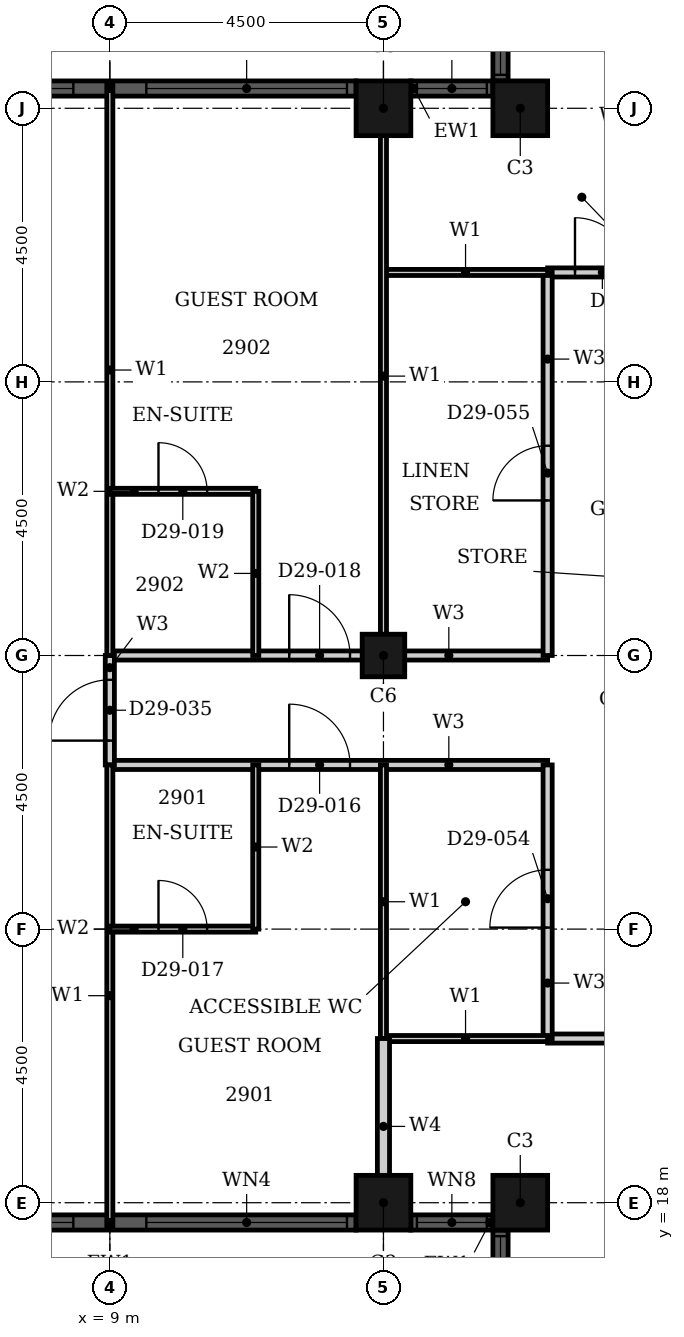
"""IFC4 building model, lengths in metres.
Left out: names, types, materials, properties, quantities, classifications, styles, units other than length and angle.
Written with IfcOpenShell. Run it as: python <this file> out.ifc"""

import sys

from ifc_helpers import new_model, si_unit, direction, frame, frame_2d, origin, origin_2d, place, context, subcontext, project, spatial, rectangle, hollow_rectangle, extrude, element, fill, save


model = new_model("IFC4")
c1 = context("Model", 3, precision=1e-05, world=origin(), true_north=direction((0.0, 1.0)))
c2 = subcontext(c1, "Body", "Model", "MODEL_VIEW")
j1 = project(units=[si_unit("LENGTHUNIT", "METRE"), si_unit("PLANEANGLEUNIT", "RADIAN")], contexts=[c1])
p1 = place(None, origin())
s1 = spatial("IfcSite", under=j1, at=p1, CompositionType="ELEMENT")
p2 = place(p1, origin())
s2 = spatial("IfcBuilding", under=s1, at=p2, CompositionType="ELEMENT")
p3 = place(p2, frame((0.0, 0.0, 118.8)))
s3 = spatial("IfcBuildingStorey", under=s2, at=p3, CompositionType="ELEMENT", Elevation=118.8)
for number, where, z_axis, x_axis in (
    (1, (15.75, 36.0, 0.0), (0.0, 0.0, 1.0), (1.0, 0.0, 0.0)),
    (2, (13.5, 36.0, 0.0), (0.0, 0.0, 1.0), (1.0, 0.0, 0.0)),
    (3, (13.5, 18.0, 0.0), (0.0, 0.0, 1.0), (1.0, 0.0, 0.0)),
    (4, (15.75, 18.0, 0.0), (0.0, 0.0, 1.0), (1.0, 0.0, 0.0)),
):
    element("IfcColumn", number, at=place(p3, frame(where, z_axis=z_axis, x_axis=x_axis)), inside=s3, PredefinedType="COLUMN", context=c2, shape_type="SweptSolid", body=[
        extrude(hollow_rectangle(XDim=0.9, YDim=0.9, WallThickness=0.028, at=origin_2d()), origin(), (0.0, 0.0, 1.0), 3.6),
    ])
p4 = place(p3, frame((13.5, 27.0, 0.0), z_axis=(0.0, 0.0, 1.0), x_axis=(1.0, 0.0, 0.0)))
e5 = element("IfcColumn", 5, at=p4, inside=s3, PredefinedType="COLUMN", context=c2, shape_type="SweptSolid", body=[
    extrude(hollow_rectangle(XDim=0.7, YDim=0.7, WallThickness=0.022, at=origin_2d()), origin(), (0.0, 0.0, 1.0), 3.6),
])
p5 = place(p3, frame((15.425, 37.8, 0.0), z_axis=(0.0, 0.0, 1.0), x_axis=(0.0, -1.0, 0.0)))
e6 = element("IfcWall", 6, at=p5, inside=s3, PredefinedType="SOLIDWALL", context=c2, shape_type="SweptSolid", body=[
    extrude(rectangle(XDim=1.35, YDim=0.25, at=frame_2d((0.675, 0.0))), origin(), (0.0, 0.0, 1.0), 3.6),
])
p6 = place(p5, frame((0.1, 0.0, 0.9)))
e7 = element("IfcOpeningElement", 7, at=p6, cuts=e6, PredefinedType="OPENING", context=c2, shape_type="SweptSolid", body=[
    extrude(rectangle(XDim=1.15, YDim=2.08, at=frame_2d((0.575, 1.04))), frame((0.0, 0.135, 0.0), z_axis=(0.0, -1.0, 0.0), x_axis=(1.0, 0.0, 0.0)), (0.0, 0.0, 1.0), 0.27),
])
p7 = place(p3, frame((15.3, 36.325, 0.0), z_axis=(0.0, 0.0, 1.0), x_axis=(-1.0, 0.0, 0.0)))
e8 = element("IfcWall", 8, at=p7, inside=s3, PredefinedType="SOLIDWALL", context=c2, shape_type="SweptSolid", body=[
    extrude(rectangle(XDim=1.35, YDim=0.25, at=frame_2d((0.675, 0.0))), origin(), (0.0, 0.0, 1.0), 3.6),
])
p8 = place(p7, frame((0.1, 0.0, 0.9)))
e9 = element("IfcOpeningElement", 9, at=p8, cuts=e8, PredefinedType="OPENING", context=c2, shape_type="SweptSolid", body=[
    extrude(rectangle(XDim=1.15, YDim=2.08, at=frame_2d((0.575, 1.04))), frame((0.0, 0.135, 0.0), z_axis=(0.0, -1.0, 0.0), x_axis=(1.0, 0.0, 0.0)), (0.0, 0.0, 1.0), 0.27),
])
p9 = place(p3, frame((13.05, 36.325, 0.0), z_axis=(0.0, 0.0, 1.0), x_axis=(-1.0, 0.0, 0.0)))
e10 = element("IfcWall", 10, at=p9, inside=s3, PredefinedType="SOLIDWALL", context=c2, shape_type="SweptSolid", body=[
    extrude(rectangle(XDim=8.1, YDim=0.25, at=frame_2d((4.05, 0.0))), origin(), (0.0, 0.0, 1.0), 3.6),
])
p10 = place(p9, frame((0.15, 0.0, 0.9)))
e11 = element("IfcOpeningElement", 11, at=p10, cuts=e10, PredefinedType="OPENING", context=c2, shape_type="SweptSolid", body=[
    extrude(rectangle(XDim=3.3, YDim=2.08, at=frame_2d((1.65, 1.04))), frame((0.0, 0.135, 0.0), z_axis=(0.0, -1.0, 0.0), x_axis=(1.0, 0.0, 0.0)), (0.0, 0.0, 1.0), 0.27),
])
p11 = place(p9, frame((4.65, 0.0, 0.9)))
e12 = element("IfcOpeningElement", 12, at=p11, cuts=e10, PredefinedType="OPENING", context=c2, shape_type="SweptSolid", body=[
    extrude(rectangle(XDim=3.3, YDim=2.08, at=frame_2d((1.65, 1.04))), frame((0.0, 0.135, 0.0), z_axis=(0.0, -1.0, 0.0), x_axis=(1.0, 0.0, 0.0)), (0.0, 0.0, 1.0), 0.27),
])
p12 = place(p3, frame((4.95, 17.675, 0.0), z_axis=(0.0, 0.0, 1.0), x_axis=(1.0, 0.0, 0.0)))
e13 = element("IfcWall", 13, at=p12, inside=s3, PredefinedType="SOLIDWALL", context=c2, shape_type="SweptSolid", body=[
    extrude(rectangle(XDim=8.1, YDim=0.25, at=frame_2d((4.05, 0.0))), origin(), (0.0, 0.0, 1.0), 3.6),
])
p13 = place(p12, frame((0.15, 0.0, 0.9)))
e14 = element("IfcOpeningElement", 14, at=p13, cuts=e13, PredefinedType="OPENING", context=c2, shape_type="SweptSolid", body=[
    extrude(rectangle(XDim=3.3, YDim=2.08, at=frame_2d((1.65, 1.04))), frame((0.0, 0.135, 0.0), z_axis=(0.0, -1.0, 0.0), x_axis=(1.0, 0.0, 0.0)), (0.0, 0.0, 1.0), 0.27),
])
p14 = place(p12, frame((4.65, 0.0, 0.9)))
e15 = element("IfcOpeningElement", 15, at=p14, cuts=e13, PredefinedType="OPENING", context=c2, shape_type="SweptSolid", body=[
    extrude(rectangle(XDim=3.3, YDim=2.08, at=frame_2d((1.65, 1.04))), frame((0.0, 0.135, 0.0), z_axis=(0.0, -1.0, 0.0), x_axis=(1.0, 0.0, 0.0)), (0.0, 0.0, 1.0), 0.27),
])
p15 = place(p3, frame((13.95, 17.675, 0.0), z_axis=(0.0, 0.0, 1.0), x_axis=(1.0, 0.0, 0.0)))
e16 = element("IfcWall", 16, at=p15, inside=s3, PredefinedType="SOLIDWALL", context=c2, shape_type="SweptSolid", body=[
    extrude(rectangle(XDim=1.35, YDim=0.25, at=frame_2d((0.675, 0.0))), origin(), (0.0, 0.0, 1.0), 3.6),
])
p16 = place(p15, frame((0.1, 0.0, 0.9)))
e17 = element("IfcOpeningElement", 17, at=p16, cuts=e16, PredefinedType="OPENING", context=c2, shape_type="SweptSolid", body=[
    extrude(rectangle(XDim=1.15, YDim=2.08, at=frame_2d((0.575, 1.04))), frame((0.0, 0.135, 0.0), z_axis=(0.0, -1.0, 0.0), x_axis=(1.0, 0.0, 0.0)), (0.0, 0.0, 1.0), 0.27),
])
p17 = place(p3, frame((15.425, 17.55, 0.0), z_axis=(0.0, 0.0, 1.0), x_axis=(0.0, -1.0, 0.0)))
e18 = element("IfcWall", 18, at=p17, inside=s3, PredefinedType="SOLIDWALL", context=c2, shape_type="SweptSolid", body=[
    extrude(rectangle(XDim=1.35, YDim=0.25, at=frame_2d((0.675, 0.0))), origin(), (0.0, 0.0, 1.0), 3.6),
])
p18 = place(p17, frame((0.1, 0.0, 0.9)))
e19 = element("IfcOpeningElement", 19, at=p18, cuts=e18, PredefinedType="OPENING", context=c2, shape_type="SweptSolid", body=[
    extrude(rectangle(XDim=1.15, YDim=2.08, at=frame_2d((0.575, 1.04))), frame((0.0, 0.135, 0.0), z_axis=(0.0, -1.0, 0.0), x_axis=(1.0, 0.0, 0.0)), (0.0, 0.0, 1.0), 0.27),
])
p19 = place(p3, frame((16.2, 20.7, 0.0), z_axis=(0.0, 0.0, 1.0), x_axis=(1.0, 0.0, 0.0)))
e20 = element("IfcWall", 20, at=p19, inside=s3, PredefinedType="PARTITIONING", context=c2, shape_type="SweptSolid", body=[
    extrude(rectangle(XDim=13.5, YDim=0.15, at=frame_2d((6.75, 0.0))), origin(), (0.0, 0.0, 1.0), 3.3),
])
p20 = place(p19, frame((4.75, 0.0, 0.0)))
e21 = element("IfcOpeningElement", 21, at=p20, cuts=e20, PredefinedType="OPENING", context=c2, shape_type="SweptSolid", body=[
    extrude(rectangle(XDim=1.0, YDim=2.1, at=frame_2d((0.5, 1.05))), frame((0.0, 0.085, 0.0), z_axis=(0.0, -1.0, 0.0), x_axis=(1.0, 0.0, 0.0)), (0.0, 0.0, 1.0), 0.17),
])
p21 = place(p19, frame((9.45, 0.0, 0.0)))
e22 = element("IfcOpeningElement", 22, at=p21, cuts=e20, PredefinedType="OPENING", context=c2, shape_type="SweptSolid", body=[
    extrude(rectangle(XDim=0.9, YDim=2.1, at=frame_2d((0.45, 1.05))), frame((0.0, 0.085, 0.0), z_axis=(0.0, -1.0, 0.0), x_axis=(1.0, 0.0, 0.0)), (0.0, 0.0, 1.0), 0.17),
])
p22 = place(p3, frame((9.0, 25.2, 0.0), z_axis=(0.0, 0.0, 1.0), x_axis=(1.0, 0.0, 0.0)))
e23 = element("IfcWall", 23, at=p22, inside=s3, PredefinedType="PARTITIONING", context=c2, shape_type="SweptSolid", body=[
    extrude(rectangle(XDim=7.2, YDim=0.15, at=frame_2d((3.6, 0.0))), origin(), (0.0, 0.0, 1.0), 3.3),
])
p23 = place(p22, frame((2.95, 0.0, 0.0)))
e24 = element("IfcOpeningElement", 24, at=p23, cuts=e23, PredefinedType="OPENING", context=c2, shape_type="SweptSolid", body=[
    extrude(rectangle(XDim=1.0, YDim=2.1, at=frame_2d((0.5, 1.05))), frame((0.0, 0.085, 0.0), z_axis=(0.0, -1.0, 0.0), x_axis=(1.0, 0.0, 0.0)), (0.0, 0.0, 1.0), 0.17),
])
p24 = place(p3, frame((9.0, 27.0, 0.0), z_axis=(0.0, 0.0, 1.0), x_axis=(1.0, 0.0, 0.0)))
e25 = element("IfcWall", 25, at=p24, inside=s3, PredefinedType="PARTITIONING", context=c2, shape_type="SweptSolid", body=[
    extrude(rectangle(XDim=7.2, YDim=0.15, at=frame_2d((3.6, 0.0))), origin(), (0.0, 0.0, 1.0), 2.58),
])
p25 = place(p24, frame((2.95, 0.0, 0.0)))
e26 = element("IfcOpeningElement", 26, at=p25, cuts=e25, PredefinedType="OPENING", context=c2, shape_type="SweptSolid", body=[
    extrude(rectangle(XDim=1.0, YDim=2.1, at=frame_2d((0.5, 1.05))), frame((0.0, 0.085, 0.0), z_axis=(0.0, -1.0, 0.0), x_axis=(1.0, 0.0, 0.0)), (0.0, 0.0, 1.0), 0.17),
])
p26 = place(p3, frame((16.2, 33.3, 0.0), z_axis=(0.0, 0.0, 1.0), x_axis=(1.0, 0.0, 0.0)))
e27 = element("IfcWall", 27, at=p26, inside=s3, PredefinedType="PARTITIONING", context=c2, shape_type="SweptSolid", body=[
    extrude(rectangle(XDim=15.3, YDim=0.15, at=frame_2d((7.65, 0.0))), origin(), (0.0, 0.0, 1.0), 3.3),
])
p27 = place(p26, frame((4.75, 0.0, 0.0)))
e28 = element("IfcOpeningElement", 28, at=p27, cuts=e27, PredefinedType="OPENING", context=c2, shape_type="SweptSolid", body=[
    extrude(rectangle(XDim=1.0, YDim=2.1, at=frame_2d((0.5, 1.05))), frame((0.0, 0.085, 0.0), z_axis=(0.0, -1.0, 0.0), x_axis=(1.0, 0.0, 0.0)), (0.0, 0.0, 1.0), 0.17),
])
p28 = place(p26, frame((0.45, 0.0, 0.0)))
e29 = element("IfcOpeningElement", 29, at=p28, cuts=e27, PredefinedType="OPENING", context=c2, shape_type="SweptSolid", body=[
    extrude(rectangle(XDim=0.9, YDim=2.1, at=frame_2d((0.45, 1.05))), frame((0.0, 0.085, 0.0), z_axis=(0.0, -1.0, 0.0), x_axis=(1.0, 0.0, 0.0)), (0.0, 0.0, 1.0), 0.17),
])
p29 = place(p26, frame((10.35, 0.0, 0.0)))
e30 = element("IfcOpeningElement", 30, at=p29, cuts=e27, PredefinedType="OPENING", context=c2, shape_type="SweptSolid", body=[
    extrude(rectangle(XDim=0.9, YDim=2.1, at=frame_2d((0.45, 1.05))), frame((0.0, 0.085, 0.0), z_axis=(0.0, -1.0, 0.0), x_axis=(1.0, 0.0, 0.0)), (0.0, 0.0, 1.0), 0.17),
])
p30 = place(p3, frame((16.2, 27.0, 0.0), z_axis=(0.0, 0.0, 1.0), x_axis=(0.0, 1.0, 0.0)))
e31 = element("IfcWall", 31, at=p30, inside=s3, PredefinedType="PARTITIONING", context=c2, shape_type="SweptSolid", body=[
    extrude(rectangle(XDim=6.3, YDim=0.15, at=frame_2d((3.15, 0.0))), origin(), (0.0, 0.0, 1.0), 3.3),
])
p31 = place(p30, frame((2.55, 0.0, 0.0)))
e32 = element("IfcOpeningElement", 32, at=p31, cuts=e31, PredefinedType="OPENING", context=c2, shape_type="SweptSolid", body=[
    extrude(rectangle(XDim=0.9, YDim=2.1, at=frame_2d((0.45, 1.05))), frame((0.0, 0.085, 0.0), z_axis=(0.0, -1.0, 0.0), x_axis=(1.0, 0.0, 0.0)), (0.0, 0.0, 1.0), 0.17),
])
p32 = place(p3, frame((16.2, 20.7, 0.0), z_axis=(0.0, 0.0, 1.0), x_axis=(0.0, 1.0, 0.0)))
e33 = element("IfcWall", 33, at=p32, inside=s3, PredefinedType="PARTITIONING", context=c2, shape_type="SweptSolid", body=[
    extrude(rectangle(XDim=4.5, YDim=0.15, at=frame_2d((2.25, 0.0))), origin(), (0.0, 0.0, 1.0), 3.3),
])
p33 = place(p32, frame((1.825, 0.0, 0.0)))
e34 = element("IfcOpeningElement", 34, at=p33, cuts=e33, PredefinedType="OPENING", context=c2, shape_type="SweptSolid", body=[
    extrude(rectangle(XDim=0.95, YDim=2.1, at=frame_2d((0.475, 1.05))), frame((0.0, 0.085, 0.0), z_axis=(0.0, -1.0, 0.0), x_axis=(1.0, 0.0, 0.0)), (0.0, 0.0, 1.0), 0.17),
])
p34 = place(p3, frame((9.0, 25.2, 0.0), z_axis=(0.0, 0.0, 1.0), x_axis=(0.0, 1.0, 0.0)))
e35 = element("IfcWall", 35, at=p34, inside=s3, PredefinedType="PARTITIONING", context=c2, shape_type="SweptSolid", body=[
    extrude(rectangle(XDim=1.8, YDim=0.15, at=frame_2d((0.9, 0.0))), origin(), (0.0, 0.0, 1.0), 3.3),
])
p35 = place(p34, frame((0.4, 0.0, 0.0)))
e36 = element("IfcOpeningElement", 36, at=p35, cuts=e35, PredefinedType="OPENING", context=c2, shape_type="SweptSolid", body=[
    extrude(rectangle(XDim=1.0, YDim=2.1, at=frame_2d((0.5, 1.05))), frame((0.0, 0.085, 0.0), z_axis=(0.0, -1.0, 0.0), x_axis=(1.0, 0.0, 0.0)), (0.0, 0.0, 1.0), 0.17),
])
for number, where, z_axis, x_axis in (
    (37, (13.5, 20.7, 0.0), (0.0, 0.0, 1.0), (1.0, 0.0, 0.0)),
    (38, (13.5, 33.3, 0.0), (0.0, 0.0, 1.0), (1.0, 0.0, 0.0)),
):
    element("IfcWall", number, at=place(p3, frame(where, z_axis=z_axis, x_axis=x_axis)), inside=s3, PredefinedType="PARTITIONING", context=c2, shape_type="SweptSolid", body=[
        extrude(rectangle(XDim=2.7, YDim=0.1, at=frame_2d((1.35, 0.0))), origin(), (0.0, 0.0, 1.0), 3.3),
    ])
p36 = place(p3, frame((13.5, 27.0, 0.0), z_axis=(0.0, 0.0, 1.0), x_axis=(0.0, 1.0, 0.0)))
e39 = element("IfcWall", 39, at=p36, inside=s3, PredefinedType="PARTITIONING", context=c2, shape_type="SweptSolid", body=[
    extrude(rectangle(XDim=9.19, YDim=0.1, at=frame_2d((4.595, 0.0))), origin(), (0.0, 0.0, 1.0), 2.38),
])
p37 = place(p3, frame((13.5, 20.7, 0.0), z_axis=(0.0, 0.0, 1.0), x_axis=(0.0, 1.0, 0.0)))
e40 = element("IfcWall", 40, at=p37, inside=s3, PredefinedType="PARTITIONING", context=c2, shape_type="SweptSolid", body=[
    extrude(rectangle(XDim=4.5, YDim=0.1, at=frame_2d((2.25, 0.0))), origin(), (0.0, 0.0, 1.0), 2.38),
])
p38 = place(p3, frame((9.0, 27.0, 0.0), z_axis=(0.0, 0.0, 1.0), x_axis=(0.0, 1.0, 0.0)))
e41 = element("IfcWall", 41, at=p38, inside=s3, PredefinedType="PARTITIONING", context=c2, shape_type="SweptSolid", body=[
    extrude(rectangle(XDim=9.39, YDim=0.1, at=frame_2d((4.695, 0.0))), origin(), (0.0, 0.0, 1.0), 3.3),
])
p39 = place(p3, frame((9.0, 17.61, 0.0), z_axis=(0.0, 0.0, 1.0), x_axis=(0.0, 1.0, 0.0)))
e42 = element("IfcWall", 42, at=p39, inside=s3, PredefinedType="PARTITIONING", context=c2, shape_type="SweptSolid", body=[
    extrude(rectangle(XDim=7.59, YDim=0.1, at=frame_2d((3.795, 0.0))), origin(), (0.0, 0.0, 1.0), 3.3),
])
p40 = place(p3, frame((13.5, 17.81, 0.0), z_axis=(0.0, 0.0, 1.0), x_axis=(0.0, 1.0, 0.0)))
e43 = element("IfcWall", 43, at=p40, inside=s3, PredefinedType="PARTITIONING", context=c2, shape_type="SweptSolid", body=[
    extrude(rectangle(XDim=2.89, YDim=0.2, at=frame_2d((1.445, 0.0))), origin(), (0.0, 0.0, 1.0), 2.38),
])
p41 = place(p3, frame((9.0, 22.5, 0.0), z_axis=(0.0, 0.0, 1.0), x_axis=(1.0, 0.0, 0.0)))
e44 = element("IfcWall", 44, at=p41, inside=s3, PredefinedType="PARTITIONING", context=c2, shape_type="SweptSolid", body=[
    extrude(rectangle(XDim=2.4, YDim=0.1, at=frame_2d((1.2, 0.0))), origin(), (0.0, 0.0, 1.0), 2.58),
])
p42 = place(p41, frame((0.8, 0.0, 0.0)))
e45 = element("IfcOpeningElement", 45, at=p42, cuts=e44, PredefinedType="OPENING", context=c2, shape_type="SweptSolid", body=[
    extrude(rectangle(XDim=0.8, YDim=2.1, at=frame_2d((0.4, 1.05))), frame((0.0, 0.06, 0.0), z_axis=(0.0, -1.0, 0.0), x_axis=(1.0, 0.0, 0.0)), (0.0, 0.0, 1.0), 0.12),
])
p43 = place(p3, frame((9.0, 29.7, 0.0), z_axis=(0.0, 0.0, 1.0), x_axis=(1.0, 0.0, 0.0)))
e46 = element("IfcWall", 46, at=p43, inside=s3, PredefinedType="PARTITIONING", context=c2, shape_type="SweptSolid", body=[
    extrude(rectangle(XDim=2.4, YDim=0.1, at=frame_2d((1.2, 0.0))), origin(), (0.0, 0.0, 1.0), 3.3),
])
p44 = place(p43, frame((0.8, 0.0, 0.0)))
e47 = element("IfcOpeningElement", 47, at=p44, cuts=e46, PredefinedType="OPENING", context=c2, shape_type="SweptSolid", body=[
    extrude(rectangle(XDim=0.8, YDim=2.1, at=frame_2d((0.4, 1.05))), frame((0.0, 0.06, 0.0), z_axis=(0.0, -1.0, 0.0), x_axis=(1.0, 0.0, 0.0)), (0.0, 0.0, 1.0), 0.12),
])
for number, where, z_axis, x_axis in (
    (48, (11.4, 27.0, 0.0), (0.0, 0.0, 1.0), (0.0, 1.0, 0.0)),
    (49, (11.4, 22.5, 0.0), (0.0, 0.0, 1.0), (0.0, 1.0, 0.0)),
):
    element("IfcWall", number, at=place(p3, frame(where, z_axis=z_axis, x_axis=x_axis)), inside=s3, PredefinedType="PARTITIONING", context=c2, shape_type="SweptSolid", body=[
        extrude(rectangle(XDim=2.7, YDim=0.1, at=frame_2d((1.35, 0.0))), origin(), (0.0, 0.0, 1.0), 3.3),
    ])
p45 = place(p6, origin())
e50 = element("IfcWindow", 50, at=p45, inside=s3, PartitioningType="SINGLE_PANEL", PredefinedType="WINDOW", context=c2, shape_type="SweptSolid", body=[
    extrude(rectangle(XDim=1.15, YDim=2.08, at=frame_2d((0.575, 1.04))), frame((0.0, 0.03, 0.0), z_axis=(0.0, -1.0, 0.0), x_axis=(1.0, 0.0, 0.0)), (0.0, 0.0, 1.0), 0.06),
])
fill(e7, e50)
p46 = place(p8, origin())
e51 = element("IfcWindow", 51, at=p46, inside=s3, PartitioningType="SINGLE_PANEL", PredefinedType="WINDOW", context=c2, shape_type="SweptSolid", body=[
    extrude(rectangle(XDim=1.15, YDim=2.08, at=frame_2d((0.575, 1.04))), frame((0.0, 0.03, 0.0), z_axis=(0.0, -1.0, 0.0), x_axis=(1.0, 0.0, 0.0)), (0.0, 0.0, 1.0), 0.06),
])
fill(e9, e51)
p47 = place(p10, origin())
e52 = element("IfcWindow", 52, at=p47, inside=s3, PartitioningType="SINGLE_PANEL", PredefinedType="WINDOW", context=c2, shape_type="SweptSolid", body=[
    extrude(rectangle(XDim=3.3, YDim=2.08, at=frame_2d((1.65, 1.04))), frame((0.0, 0.03, 0.0), z_axis=(0.0, -1.0, 0.0), x_axis=(1.0, 0.0, 0.0)), (0.0, 0.0, 1.0), 0.06),
])
fill(e11, e52)
p48 = place(p11, origin())
e53 = element("IfcWindow", 53, at=p48, inside=s3, PartitioningType="SINGLE_PANEL", PredefinedType="WINDOW", context=c2, shape_type="SweptSolid", body=[
    extrude(rectangle(XDim=3.3, YDim=2.08, at=frame_2d((1.65, 1.04))), frame((0.0, 0.03, 0.0), z_axis=(0.0, -1.0, 0.0), x_axis=(1.0, 0.0, 0.0)), (0.0, 0.0, 1.0), 0.06),
])
fill(e12, e53)
p49 = place(p13, origin())
e54 = element("IfcWindow", 54, at=p49, inside=s3, PartitioningType="SINGLE_PANEL", PredefinedType="WINDOW", context=c2, shape_type="SweptSolid", body=[
    extrude(rectangle(XDim=3.3, YDim=2.08, at=frame_2d((1.65, 1.04))), frame((0.0, 0.03, 0.0), z_axis=(0.0, -1.0, 0.0), x_axis=(1.0, 0.0, 0.0)), (0.0, 0.0, 1.0), 0.06),
])
fill(e14, e54)
p50 = place(p14, origin())
e55 = element("IfcWindow", 55, at=p50, inside=s3, PartitioningType="SINGLE_PANEL", PredefinedType="WINDOW", context=c2, shape_type="SweptSolid", body=[
    extrude(rectangle(XDim=3.3, YDim=2.08, at=frame_2d((1.65, 1.04))), frame((0.0, 0.03, 0.0), z_axis=(0.0, -1.0, 0.0), x_axis=(1.0, 0.0, 0.0)), (0.0, 0.0, 1.0), 0.06),
])
fill(e15, e55)
p51 = place(p16, origin())
e56 = element("IfcWindow", 56, at=p51, inside=s3, PartitioningType="SINGLE_PANEL", PredefinedType="WINDOW", context=c2, shape_type="SweptSolid", body=[
    extrude(rectangle(XDim=1.15, YDim=2.08, at=frame_2d((0.575, 1.04))), frame((0.0, 0.03, 0.0), z_axis=(0.0, -1.0, 0.0), x_axis=(1.0, 0.0, 0.0)), (0.0, 0.0, 1.0), 0.06),
])
fill(e17, e56)
p52 = place(p18, origin())
e57 = element("IfcWindow", 57, at=p52, inside=s3, PartitioningType="SINGLE_PANEL", PredefinedType="WINDOW", context=c2, shape_type="SweptSolid", body=[
    extrude(rectangle(XDim=1.15, YDim=2.08, at=frame_2d((0.575, 1.04))), frame((0.0, 0.03, 0.0), z_axis=(0.0, -1.0, 0.0), x_axis=(1.0, 0.0, 0.0)), (0.0, 0.0, 1.0), 0.06),
])
fill(e19, e57)
p53 = place(p23, origin())
e58 = element("IfcDoor", 58, at=p53, inside=s3, OperationType="SINGLE_SWING_RIGHT", PredefinedType="DOOR", context=c2, shape_type="SweptSolid", body=[
    extrude(rectangle(XDim=1.0, YDim=2.1, at=frame_2d((0.5, 1.05))), frame((0.0, 0.025, 0.0), z_axis=(0.0, -1.0, 0.0), x_axis=(1.0, 0.0, 0.0)), (0.0, 0.0, 1.0), 0.05),
])
fill(e24, e58)
p54 = place(p42, origin())
e59 = element("IfcDoor", 59, at=p54, inside=s3, OperationType="SINGLE_SWING_RIGHT", PredefinedType="DOOR", context=c2, shape_type="SweptSolid", body=[
    extrude(rectangle(XDim=0.8, YDim=2.1, at=frame_2d((0.4, 1.05))), frame((0.0, 0.025, 0.0), z_axis=(0.0, -1.0, 0.0), x_axis=(1.0, 0.0, 0.0)), (0.0, 0.0, 1.0), 0.05),
])
fill(e45, e59)
p55 = place(p25, origin())
e60 = element("IfcDoor", 60, at=p55, inside=s3, OperationType="SINGLE_SWING_RIGHT", PredefinedType="DOOR", context=c2, shape_type="SweptSolid", body=[
    extrude(rectangle(XDim=1.0, YDim=2.1, at=frame_2d((0.5, 1.05))), frame((0.0, 0.025, 0.0), z_axis=(0.0, -1.0, 0.0), x_axis=(1.0, 0.0, 0.0)), (0.0, 0.0, 1.0), 0.05),
])
fill(e26, e60)
p56 = place(p44, origin())
e61 = element("IfcDoor", 61, at=p56, inside=s3, OperationType="SINGLE_SWING_LEFT", PredefinedType="DOOR", context=c2, shape_type="SweptSolid", body=[
    extrude(rectangle(XDim=0.8, YDim=2.1, at=frame_2d((0.4, 1.05))), frame((0.0, 0.025, 0.0), z_axis=(0.0, -1.0, 0.0), x_axis=(1.0, 0.0, 0.0)), (0.0, 0.0, 1.0), 0.05),
])
fill(e47, e61)
p57 = place(p35, origin())
e62 = element("IfcDoor", 62, at=p57, inside=s3, OperationType="SINGLE_SWING_RIGHT", PredefinedType="DOOR", context=c2, shape_type="SweptSolid", body=[
    extrude(rectangle(XDim=1.0, YDim=2.1, at=frame_2d((0.5, 1.05))), frame((0.0, 0.025, 0.0), z_axis=(0.0, -1.0, 0.0), x_axis=(1.0, 0.0, 0.0)), (0.0, 0.0, 1.0), 0.05),
])
fill(e36, e62)
p58 = place(p28, origin())
e63 = element("IfcDoor", 63, at=p58, inside=s3, OperationType="SINGLE_SWING_LEFT", PredefinedType="DOOR", context=c2, shape_type="SweptSolid", body=[
    extrude(rectangle(XDim=0.9, YDim=2.1, at=frame_2d((0.45, 1.05))), frame((0.0, 0.025, 0.0), z_axis=(0.0, -1.0, 0.0), x_axis=(1.0, 0.0, 0.0)), (0.0, 0.0, 1.0), 0.05),
])
fill(e29, e63)
p59 = place(p33, origin())
e64 = element("IfcDoor", 64, at=p59, inside=s3, OperationType="SINGLE_SWING_RIGHT", PredefinedType="DOOR", context=c2, shape_type="SweptSolid", body=[
    extrude(rectangle(XDim=0.95, YDim=2.1, at=frame_2d((0.475, 1.05))), frame((0.0, 0.025, 0.0), z_axis=(0.0, -1.0, 0.0), x_axis=(1.0, 0.0, 0.0)), (0.0, 0.0, 1.0), 0.05),
])
fill(e34, e64)
p60 = place(p31, origin())
e65 = element("IfcDoor", 65, at=p60, inside=s3, OperationType="SINGLE_SWING_LEFT", PredefinedType="DOOR", context=c2, shape_type="SweptSolid", body=[
    extrude(rectangle(XDim=0.9, YDim=2.1, at=frame_2d((0.45, 1.05))), frame((0.0, 0.025, 0.0), z_axis=(0.0, -1.0, 0.0), x_axis=(1.0, 0.0, 0.0)), (0.0, 0.0, 1.0), 0.05),
])
fill(e32, e65)
save(model, sys.argv[1])
